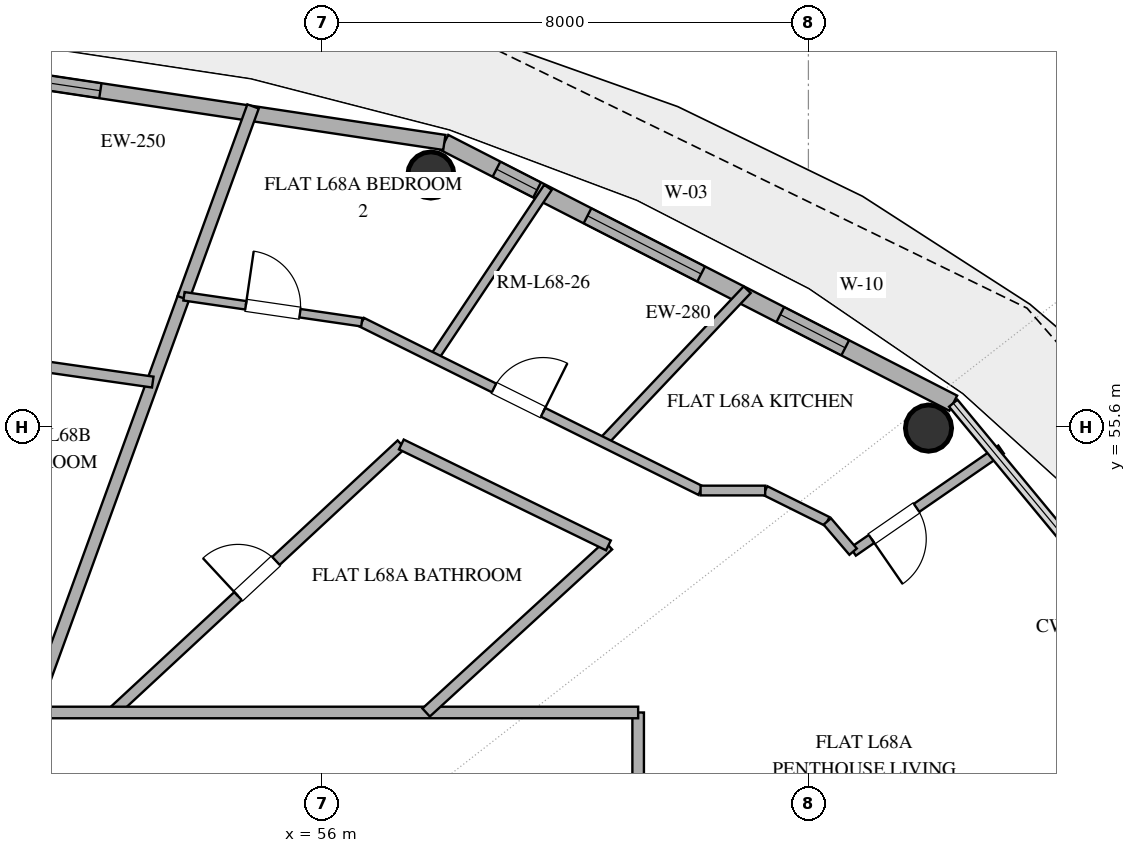
"""IFC4 building model, lengths in metres.
Left out: names, types, materials, properties, quantities, classifications, styles, units other than length and angle.
Written with IfcOpenShell. Run it as: python <this file> out.ifc"""

import sys

from ifc_helpers import new_model, si_unit, direction, frame, frame_2d, origin, origin_2d, place, context, subcontext, project, spatial, rectangle, hollow_circle, extrude, element, fill, save


model = new_model("IFC4")
c1 = context("Model", 3, precision=1e-05, world=origin(), true_north=direction((0.0, 1.0)))
c2 = subcontext(c1, "Body", "Model", "MODEL_VIEW")
j1 = project(units=[si_unit("LENGTHUNIT", "METRE"), si_unit("PLANEANGLEUNIT", "RADIAN")], contexts=[c1])
p1 = place(None, origin())
s1 = spatial("IfcSite", under=j1, at=p1, CompositionType="ELEMENT")
p2 = place(p1, origin())
s2 = spatial("IfcBuilding", under=s1, at=p2, CompositionType="ELEMENT")
p3 = place(p2, frame((0.0, 0.0, 265.8)))
s3 = spatial("IfcBuildingStorey", under=s2, at=p3, CompositionType="ELEMENT", Elevation=265.8)
for number, where, z_axis, x_axis in (
    (1, (65.975, 55.576, 0.0), (0.0, 0.0, 1.0), (1.0, 0.0, 0.0)),
    (2, (57.791, 59.739, 0.0), (0.0, 0.0, 1.0), (1.0, 0.0, 0.0)),
):
    element("IfcColumn", number, at=place(p3, frame(where, z_axis=z_axis, x_axis=x_axis)), inside=s3, PredefinedType="COLUMN", context=c2, shape_type="SweptSolid", body=[
        extrude(hollow_circle(Radius=0.381, WallThickness=0.025, at=origin_2d()), origin(), (0.0, 0.0, 1.0), 3.37),
    ])
p4 = place(p3, frame((66.383, 55.987, 0.0), z_axis=(0.0, 0.0, 1.0), x_axis=(-0.890007394051, 0.455946091699, 0.0)))
e3 = element("IfcWall", 3, at=p4, inside=s3, PredefinedType="SOLIDWALL", context=c2, shape_type="SweptSolid", body=[
    extrude(rectangle(XDim=9.404, YDim=0.28, at=frame_2d((4.702, 0.0))), origin(), (0.0, 0.0, 1.0), 3.37),
])
p5 = place(p4, frame((1.996, 0.0, 0.85)))
e4 = element("IfcOpeningElement", 4, at=p5, cuts=e3, PredefinedType="OPENING", context=c2, shape_type="SweptSolid", body=[
    extrude(rectangle(XDim=1.2, YDim=1.6, at=frame_2d((0.6, 0.8))), frame((0.0, 0.15, 0.0), z_axis=(0.0, -1.0, 0.0), x_axis=(1.0, 0.0, 0.0)), (0.0, 0.0, 1.0), 0.3),
])
p6 = place(p4, frame((4.659, 0.0, 0.85)))
e5 = element("IfcOpeningElement", 5, at=p6, cuts=e3, PredefinedType="OPENING", context=c2, shape_type="SweptSolid", body=[
    extrude(rectangle(XDim=2.1, YDim=2.2, at=frame_2d((1.05, 1.1))), frame((0.0, 0.15, 0.0), z_axis=(0.0, -1.0, 0.0), x_axis=(1.0, 0.0, 0.0)), (0.0, 0.0, 1.0), 0.3),
])
p7 = place(p4, frame((7.691, 0.0, 0.85)))
e6 = element("IfcOpeningElement", 6, at=p7, cuts=e3, PredefinedType="OPENING", context=c2, shape_type="SweptSolid", body=[
    extrude(rectangle(XDim=0.75, YDim=1.8, at=frame_2d((0.375, 0.9))), frame((0.0, 0.15, 0.0), z_axis=(0.0, -1.0, 0.0), x_axis=(1.0, 0.0, 0.0)), (0.0, 0.0, 1.0), 0.3),
])
p8 = place(p3, frame((58.013, 60.274, 0.0), z_axis=(0.0, 0.0, 1.0), x_axis=(-0.988882522213, 0.148698881169, 0.0)))
e7 = element("IfcWall", 7, at=p8, inside=s3, PredefinedType="SOLIDWALL", context=c2, shape_type="SweptSolid", body=[
    extrude(rectangle(XDim=10.125, YDim=0.25, at=frame_2d((5.062, 0.0))), origin(), (0.0, 0.0, 1.0), 3.37),
])
p9 = place(p8, frame((5.721, 0.0, 0.35)))
e8 = element("IfcOpeningElement", 8, at=p9, cuts=e7, PredefinedType="OPENING", context=c2, shape_type="SweptSolid", body=[
    extrude(rectangle(XDim=1.0, YDim=1.05, at=frame_2d((0.5, 0.525))), frame((0.0, 0.135, 0.0), z_axis=(0.0, -1.0, 0.0), x_axis=(1.0, 0.0, 0.0)), (0.0, 0.0, 1.0), 0.27),
])
p10 = place(p3, frame((52.558, 50.9, 0.0), z_axis=(0.0, 0.0, 1.0), x_axis=(0.732849863846, 0.68039038578, 0.0)))
e9 = element("IfcWall", 9, at=p10, inside=s3, PredefinedType="PLUMBINGWALL", context=c2, shape_type="SweptSolid", body=[
    extrude(rectangle(XDim=6.478, YDim=0.18, at=frame_2d((3.239, 0.0))), origin(), (0.0, 0.0, 1.0), 2.73),
])
p11 = place(p10, frame((2.814, 0.0, 0.0)))
e10 = element("IfcOpeningElement", 10, at=p11, cuts=e9, PredefinedType="OPENING", context=c2, shape_type="SweptSolid", body=[
    extrude(rectangle(XDim=0.85, YDim=2.1, at=frame_2d((0.425, 1.05))), frame((0.0, 0.1, 0.0), z_axis=(0.0, -1.0, 0.0), x_axis=(1.0, 0.0, 0.0)), (0.0, 0.0, 1.0), 0.2),
])
p12 = place(p3, frame((51.239, 50.9, 0.0), z_axis=(0.0, 0.0, 1.0), x_axis=(0.342027045015, 0.939690108748, 0.0)))
e11 = element("IfcWall", 11, at=p12, inside=s3, PredefinedType="PARTITIONING", context=c2, shape_type="SweptSolid", body=[
    extrude(rectangle(XDim=7.316, YDim=0.2, at=frame_2d((3.658, 0.0))), origin(), (0.0, 0.0, 1.0), 2.73),
])
p13 = place(p3, frame((61.2, 50.9, 0.0), z_axis=(0.0, 0.0, 1.0), x_axis=(0.0, -1.0, 0.0)))
e12 = element("IfcWall", 12, at=p13, inside=s3, PredefinedType="PARTITIONING", context=c2, shape_type="SweptSolid", body=[
    extrude(rectangle(XDim=12.47, YDim=0.19, at=frame_2d((6.235, 0.0))), origin(), (0.0, 0.0, 1.0), 2.73),
])
p14 = place(p13, frame((2.198, 0.0, 0.0)))
e13 = element("IfcOpeningElement", 13, at=p14, cuts=e12, PredefinedType="OPENING", context=c2, shape_type="SweptSolid", body=[
    extrude(rectangle(XDim=1.0, YDim=2.2, at=frame_2d((0.5, 1.1))), frame((0.0, 0.105, 0.0), z_axis=(0.0, -1.0, 0.0), x_axis=(1.0, 0.0, 0.0)), (0.0, 0.0, 1.0), 0.21),
])
p15 = place(p13, frame((7.38, 0.0, 0.0)))
e14 = element("IfcOpeningElement", 14, at=p15, cuts=e12, PredefinedType="OPENING", context=c2, shape_type="SweptSolid", body=[
    extrude(rectangle(XDim=1.0, YDim=2.2, at=frame_2d((0.5, 1.1))), frame((0.0, 0.105, 0.0), z_axis=(0.0, -1.0, 0.0), x_axis=(1.0, 0.0, 0.0)), (0.0, 0.0, 1.0), 0.21),
])
p16 = place(p3, frame((51.205, 50.9, 0.0), z_axis=(0.0, 0.0, 1.0), x_axis=(1.0, 0.0, 0.0)))
e15 = element("IfcWall", 15, at=p16, inside=s3, PredefinedType="PARTITIONING", context=c2, shape_type="SweptSolid", body=[
    extrude(rectangle(XDim=9.995, YDim=0.19, at=frame_2d((4.998, 0.0))), origin(), (0.0, 0.0, 1.0), 2.73),
])
p17 = place(p3, frame((49.036, 56.932, 0.0), z_axis=(0.0, 0.0, 1.0), x_axis=(0.989927514161, -0.141575127434, 0.0)))
e16 = element("IfcWall", 16, at=p17, inside=s3, PredefinedType="PLUMBINGWALL", context=c2, shape_type="SweptSolid", body=[
    extrude(rectangle(XDim=4.223, YDim=0.18, at=frame_2d((2.112, 0.0))), origin(), (0.0, 0.0, 1.0), 2.73),
])
p18 = place(p3, frame((60.711, 53.648, 0.0), z_axis=(0.0, 0.0, 1.0), x_axis=(-0.737258783223, -0.675610454745, 0.0)))
e17 = element("IfcWall", 17, at=p18, inside=s3, PredefinedType="PLUMBINGWALL", context=c2, shape_type="SweptSolid", body=[
    extrude(rectangle(XDim=4.067, YDim=0.18, at=frame_2d((2.034, 0.0))), origin(), (0.0, 0.0, 1.0), 2.73),
])
p19 = place(p3, frame((57.305, 55.308, 0.0), z_axis=(0.0, 0.0, 1.0), x_axis=(0.898917645735, -0.438117639667, 0.0)))
e18 = element("IfcWall", 18, at=p19, inside=s3, PredefinedType="PLUMBINGWALL", context=c2, shape_type="SweptSolid", body=[
    extrude(rectangle(XDim=3.789, YDim=0.18, at=frame_2d((1.895, 0.0))), origin(), (0.0, 0.0, 1.0), 2.73),
])
p20 = place(p3, frame((60.623, 55.347, 0.0), z_axis=(0.0, 0.0, 1.0), x_axis=(0.687190766796, 0.726477012734, 0.0)))
e19 = element("IfcWall", 19, at=p20, inside=s3, PredefinedType="PLUMBINGWALL", context=c2, shape_type="SweptSolid", body=[
    extrude(rectangle(XDim=3.449, YDim=0.16, at=frame_2d((1.725, 0.0))), origin(), (0.0, 0.0, 1.0), 2.73),
])
p21 = place(p3, frame((59.717, 59.535, 0.0), z_axis=(0.0, 0.0, 1.0), x_axis=(-0.555567743092, -0.831471276013, 0.0)))
e20 = element("IfcWall", 20, at=p21, inside=s3, PredefinedType="PARTITIONING", context=c2, shape_type="SweptSolid", body=[
    extrude(rectangle(XDim=3.376, YDim=0.15, at=frame_2d((1.688, 0.0))), origin(), (0.0, 0.0, 1.0), 2.73),
])
p22 = place(p3, frame((54.867, 60.866, 0.0), z_axis=(0.0, 0.0, 1.0), x_axis=(-0.342000121366, -0.939699907942, 0.0)))
e21 = element("IfcWall", 21, at=p22, inside=s3, PredefinedType="PARTITIONING", context=c2, shape_type="SweptSolid", body=[
    extrude(rectangle(XDim=3.355, YDim=0.2, at=frame_2d((1.678, 0.0))), origin(), (0.0, 0.0, 1.0), 2.73),
])
p23 = place(p3, frame((56.655, 57.318, 0.0), z_axis=(0.0, 0.0, 1.0), x_axis=(0.89555447129, -0.444951895099, 0.0)))
e22 = element("IfcWall", 22, at=p23, inside=s3, PredefinedType="PLUMBINGWALL", context=c2, shape_type="SweptSolid", body=[
    extrude(rectangle(XDim=6.222, YDim=0.16, at=frame_2d((3.111, 0.0))), origin(), (0.0, 0.0, 1.0), 2.73),
])
p24 = place(p23, frame((2.428, 0.0, 0.0)))
e23 = element("IfcOpeningElement", 23, at=p24, cuts=e22, PredefinedType="OPENING", context=c2, shape_type="SweptSolid", body=[
    extrude(rectangle(XDim=0.9, YDim=2.1, at=frame_2d((0.45, 1.05))), frame((0.0, 0.09, 0.0), z_axis=(0.0, -1.0, 0.0), x_axis=(1.0, 0.0, 0.0)), (0.0, 0.0, 1.0), 0.18),
])
p25 = place(p3, frame((67.169, 55.224, 0.0), z_axis=(0.0, 0.0, 1.0), x_axis=(-0.823115625857, -0.567873812101, 0.0)))
e24 = element("IfcWall", 24, at=p25, inside=s3, PredefinedType="PLUMBINGWALL", context=c2, shape_type="SweptSolid", body=[
    extrude(rectangle(XDim=2.957, YDim=0.16, at=frame_2d((1.478, 0.0))), origin(), (0.0, 0.0, 1.0), 2.73),
])
p26 = place(p25, frame((1.688, 0.0, 0.0)))
e25 = element("IfcOpeningElement", 25, at=p26, cuts=e24, PredefinedType="OPENING", context=c2, shape_type="SweptSolid", body=[
    extrude(rectangle(XDim=0.9, YDim=2.1, at=frame_2d((0.45, 1.05))), frame((0.0, 0.09, 0.0), z_axis=(0.0, -1.0, 0.0), x_axis=(1.0, 0.0, 0.0)), (0.0, 0.0, 1.0), 0.18),
])
p27 = place(p3, frame((53.73, 57.744, 0.0), z_axis=(0.0, 0.0, 1.0), x_axis=(0.989530523264, -0.144323745545, 0.0)))
e26 = element("IfcWall", 26, at=p27, inside=s3, PredefinedType="PARTITIONING", context=c2, shape_type="SweptSolid", body=[
    extrude(rectangle(XDim=2.955, YDim=0.14, at=frame_2d((1.478, 0.0))), origin(), (0.0, 0.0, 1.0), 2.73),
])
p28 = place(p27, frame((1.028, 0.0, 0.0)))
e27 = element("IfcOpeningElement", 27, at=p28, cuts=e26, PredefinedType="OPENING", context=c2, shape_type="SweptSolid", body=[
    extrude(rectangle(XDim=0.9, YDim=2.1, at=frame_2d((0.45, 1.05))), frame((0.0, 0.08, 0.0), z_axis=(0.0, -1.0, 0.0), x_axis=(1.0, 0.0, 0.0)), (0.0, 0.0, 1.0), 0.16),
])
p29 = place(p3, frame((64.311, 54.042, 0.0), z_axis=(0.0, 0.0, 1.0), x_axis=(-0.895409226325, 0.445244109912, 0.0)))
e28 = element("IfcWall", 28, at=p29, inside=s3, PredefinedType="PLUMBINGWALL", context=c2, shape_type="SweptSolid", body=[
    extrude(rectangle(XDim=1.141, YDim=0.16, at=frame_2d((0.571, 0.0))), origin(), (0.0, 0.0, 1.0), 2.73),
])
p30 = place(p3, frame((63.289, 54.55, 0.0), z_axis=(0.0, 0.0, 1.0), x_axis=(-1.0, 0.0, 0.0)))
e29 = element("IfcWall", 29, at=p30, inside=s3, PredefinedType="PLUMBINGWALL", context=c2, shape_type="SweptSolid", body=[
    extrude(rectangle(XDim=1.062, YDim=0.16, at=frame_2d((0.531, 0.0))), origin(), (0.0, 0.0, 1.0), 2.73),
])
p31 = place(p3, frame((64.735, 53.545, 0.0), z_axis=(0.0, 0.0, 1.0), x_axis=(-0.649220192727, 0.760600513644, 0.0)))
e30 = element("IfcWall", 30, at=p31, inside=s3, PredefinedType="PLUMBINGWALL", context=c2, shape_type="SweptSolid", body=[
    extrude(rectangle(XDim=0.653, YDim=0.16, at=frame_2d((0.327, 0.0))), origin(), (0.0, 0.0, 1.0), 2.73),
])
p32 = place(p5, origin())
e31 = element("IfcWindow", 31, at=p32, inside=s3, PartitioningType="SINGLE_PANEL", PredefinedType="WINDOW", context=c2, shape_type="SweptSolid", body=[
    extrude(rectangle(XDim=1.2, YDim=1.6, at=frame_2d((0.6, 0.8))), frame((0.0, 0.03, 0.0), z_axis=(0.0, -1.0, 0.0), x_axis=(1.0, 0.0, 0.0)), (0.0, 0.0, 1.0), 0.06),
])
fill(e4, e31)
p33 = place(p6, origin())
e32 = element("IfcWindow", 32, at=p33, inside=s3, PartitioningType="SINGLE_PANEL", PredefinedType="WINDOW", context=c2, shape_type="SweptSolid", body=[
    extrude(rectangle(XDim=2.1, YDim=2.2, at=frame_2d((1.05, 1.1))), frame((0.0, 0.03, 0.0), z_axis=(0.0, -1.0, 0.0), x_axis=(1.0, 0.0, 0.0)), (0.0, 0.0, 1.0), 0.06),
])
fill(e5, e32)
p34 = place(p7, origin())
e33 = element("IfcWindow", 33, at=p34, inside=s3, PartitioningType="SINGLE_PANEL", PredefinedType="WINDOW", context=c2, shape_type="SweptSolid", body=[
    extrude(rectangle(XDim=0.75, YDim=1.8, at=frame_2d((0.375, 0.9))), frame((0.0, 0.03, 0.0), z_axis=(0.0, -1.0, 0.0), x_axis=(1.0, 0.0, 0.0)), (0.0, 0.0, 1.0), 0.06),
])
fill(e6, e33)
p35 = place(p9, origin())
e34 = element("IfcWindow", 34, at=p35, inside=s3, PartitioningType="SINGLE_PANEL", PredefinedType="WINDOW", context=c2, shape_type="SweptSolid", body=[
    extrude(rectangle(XDim=1.0, YDim=1.05, at=frame_2d((0.5, 0.525))), frame((0.0, 0.03, 0.0), z_axis=(0.0, -1.0, 0.0), x_axis=(1.0, 0.0, 0.0)), (0.0, 0.0, 1.0), 0.06),
])
fill(e8, e34)
p36 = place(p11, origin())
e35 = element("IfcDoor", 35, at=p36, inside=s3, OperationType="SINGLE_SWING_LEFT", PredefinedType="DOOR", context=c2, shape_type="SweptSolid", body=[
    extrude(rectangle(XDim=0.85, YDim=2.1, at=frame_2d((0.425, 1.05))), frame((0.0, 0.025, 0.0), z_axis=(0.0, -1.0, 0.0), x_axis=(1.0, 0.0, 0.0)), (0.0, 0.0, 1.0), 0.05),
])
fill(e10, e35)
p37 = place(p24, origin())
e36 = element("IfcDoor", 36, at=p37, inside=s3, OperationType="SINGLE_SWING_RIGHT", PredefinedType="DOOR", context=c2, shape_type="SweptSolid", body=[
    extrude(rectangle(XDim=0.9, YDim=2.1, at=frame_2d((0.45, 1.05))), frame((0.0, 0.025, 0.0), z_axis=(0.0, -1.0, 0.0), x_axis=(1.0, 0.0, 0.0)), (0.0, 0.0, 1.0), 0.05),
])
fill(e23, e36)
p38 = place(p26, origin())
e37 = element("IfcDoor", 37, at=p38, inside=s3, OperationType="SINGLE_SWING_RIGHT", PredefinedType="DOOR", context=c2, shape_type="SweptSolid", body=[
    extrude(rectangle(XDim=0.9, YDim=2.1, at=frame_2d((0.45, 1.05))), frame((0.0, 0.025, 0.0), z_axis=(0.0, -1.0, 0.0), x_axis=(1.0, 0.0, 0.0)), (0.0, 0.0, 1.0), 0.05),
])
fill(e25, e37)
p39 = place(p28, origin())
e38 = element("IfcDoor", 38, at=p39, inside=s3, OperationType="SINGLE_SWING_LEFT", PredefinedType="DOOR", context=c2, shape_type="SweptSolid", body=[
    extrude(rectangle(XDim=0.9, YDim=2.1, at=frame_2d((0.45, 1.05))), frame((0.0, 0.025, 0.0), z_axis=(0.0, -1.0, 0.0), x_axis=(1.0, 0.0, 0.0)), (0.0, 0.0, 1.0), 0.05),
])
fill(e27, e38)
save(model, sys.argv[1])
